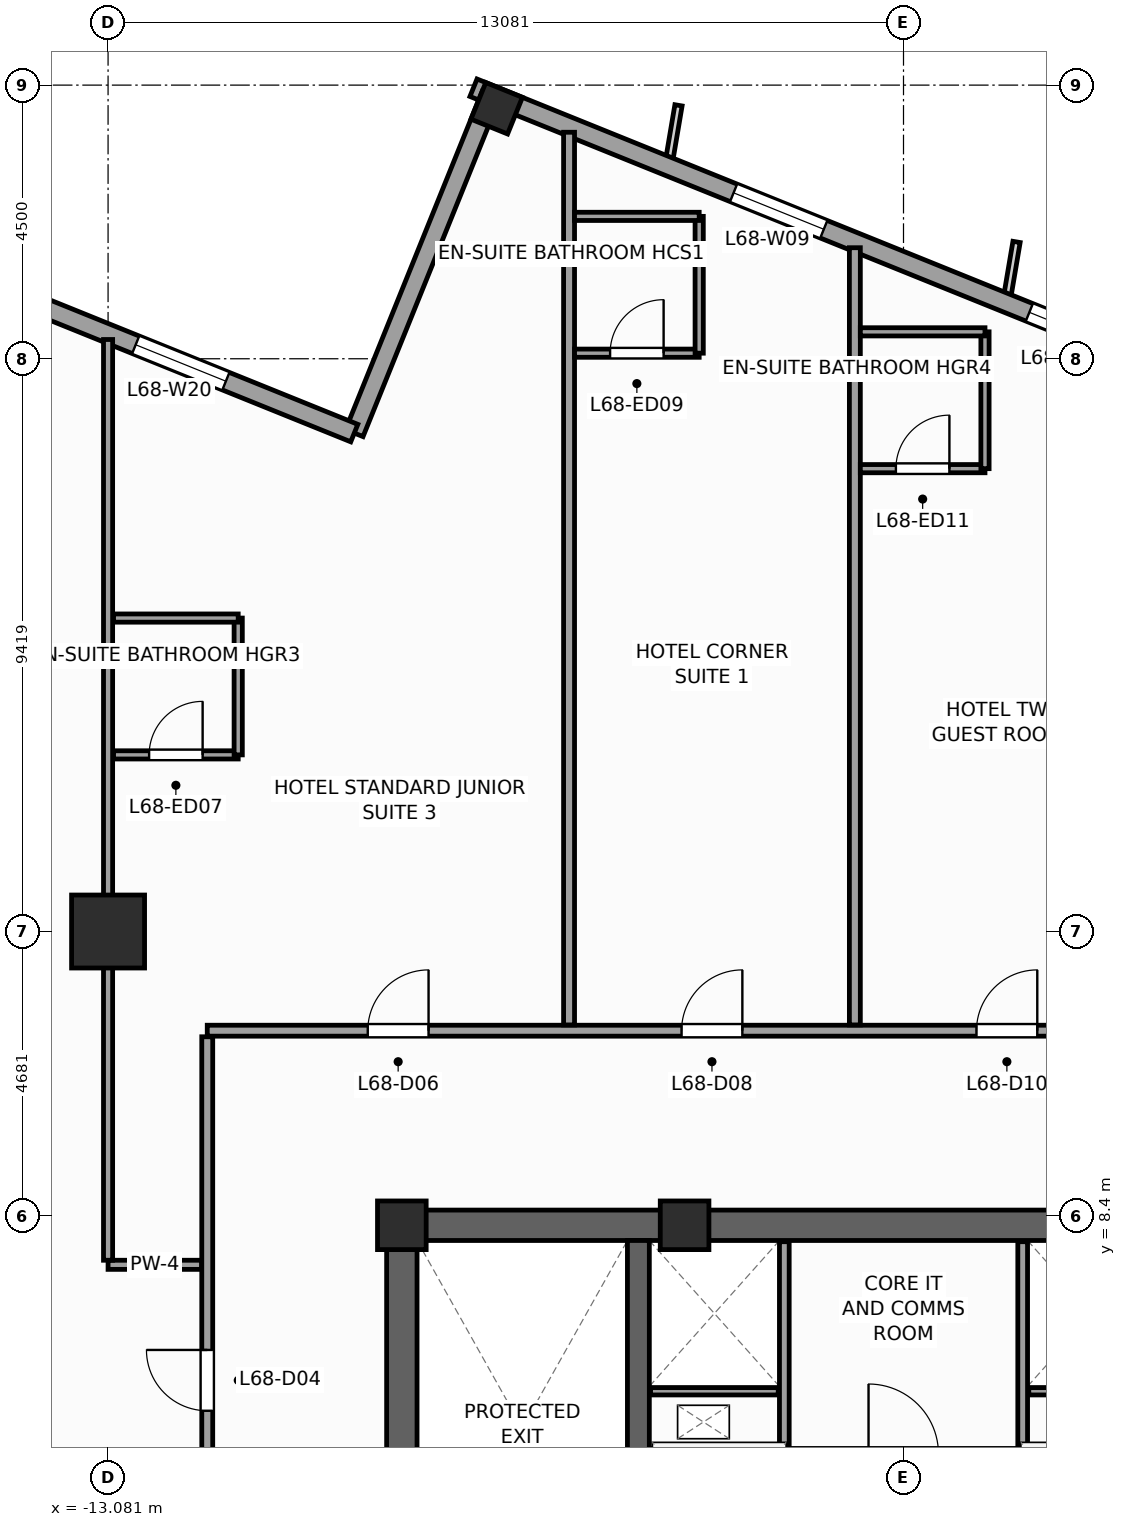
"""IFC4 building model, lengths in metres.
Left out: names, types, materials, properties, quantities, classifications, styles, units other than length and angle.
Written with IfcOpenShell. Run it as: python <this file> out.ifc"""

import sys

from ifc_helpers import new_model, si_unit, direction, frame, frame_2d, origin, origin_2d, place, context, subcontext, project, spatial, rectangle, extrude, source, transform, mapped, element, fill, save


model = new_model("IFC4")
c1 = context("Model", 3, precision=1e-05, world=origin(), true_north=direction((0.0, 1.0)))
c2 = subcontext(c1, "Body", "Model", "MODEL_VIEW")
j1 = project(units=[si_unit("LENGTHUNIT", "METRE"), si_unit("PLANEANGLEUNIT", "RADIAN")], contexts=[c1])
p1 = place(None, origin())
s1 = spatial("IfcSite", under=j1, at=p1, CompositionType="ELEMENT")
p2 = place(p1, origin())
s2 = spatial("IfcBuilding", under=s1, at=p2, CompositionType="ELEMENT")
p3 = place(p2, frame((0.0, 0.0, 279.6)))
s3 = spatial("IfcBuildingStorey", under=s2, at=p3, CompositionType="ELEMENT", Elevation=279.6)
p4 = place(p3, frame((-8.5, 8.25, 0.0), z_axis=(0.0, 0.0, 1.0), x_axis=(1.0, 0.0, 0.0)))
e1 = element("IfcWall", 1, at=p4, inside=s3, PredefinedType="SHEAR", context=c2, shape_type="SweptSolid", body=[
    extrude(rectangle(XDim=17.0, YDim=0.5, at=frame_2d((8.5, 0.0))), origin(), (0.0, 0.0, 1.0), 3.6),
])
p5 = place(p3, frame((-8.25, -8.0, 0.0), z_axis=(0.0, 0.0, 1.0), x_axis=(0.0, 1.0, 0.0)))
e2 = element("IfcWall", 2, at=p5, inside=s3, PredefinedType="SHEAR", context=c2, shape_type="SweptSolid", body=[
    extrude(rectangle(XDim=16.0, YDim=0.5, at=frame_2d((8.0, 0.0))), origin(), (0.0, 0.0, 1.0), 3.6),
])
p6 = place(p5, frame((4.69, 0.0, 0.0)))
e3 = element("IfcOpeningElement", 3, at=p6, cuts=e2, PredefinedType="OPENING", context=c2, shape_type="SweptSolid", body=[
    extrude(rectangle(XDim=1.3, YDim=2.2, at=frame_2d((0.65, 1.1))), frame((0.0, 0.26, 0.0), z_axis=(0.0, -1.0, 0.0), x_axis=(1.0, 0.0, 0.0)), (0.0, 0.0, 1.0), 0.52),
])
p7 = place(p3, frame((-4.36, -8.0, 0.0), z_axis=(0.0, 0.0, 1.0), x_axis=(0.0, 1.0, 0.0)))
e4 = element("IfcWall", 4, at=p7, inside=s3, PredefinedType="SHEAR", context=c2, shape_type="SweptSolid", body=[
    extrude(rectangle(XDim=16.0, YDim=0.36, at=frame_2d((8.0, 0.0))), origin(), (0.0, 0.0, 1.0), 3.6),
])
m1 = source(origin(), c2, "Body", "SweptSolid", [
    extrude(rectangle(XDim=0.8, YDim=0.8, at=origin_2d()), origin(), (0.0, 0.0, 1.0), 3.6),
])
for number, where, z_axis, x_axis in (
    (5, (-8.25, 8.25, 0.0), (0.0, 0.0, 1.0), (1.0, 0.0, 0.0)),
    (6, (-3.6, 8.25, 0.0), (0.0, 0.0, 1.0), (1.0, 0.0, 0.0)),
):
    element("IfcColumn", number, at=place(p3, frame(where, z_axis=z_axis, x_axis=x_axis)), inside=s3, PredefinedType="PILASTER", context=c2, shape_type="MappedRepresentation", body=[
        mapped(m1, transform((0.0, 0.0, 0.0), scale=1.0)),
    ])
m2 = source(origin(), c2, "Body", "SweptSolid", [
    extrude(rectangle(XDim=1.2, YDim=1.2, at=origin_2d()), origin(), (0.0, 0.0, 1.0), 3.6),
])
p8 = place(p3, frame((-13.081, 13.081, 0.0), z_axis=(0.0, 0.0, 1.0), x_axis=(1.0, 0.0, 0.0)))
e7 = element("IfcColumn", 7, at=p8, inside=s3, PredefinedType="COLUMN", context=c2, shape_type="MappedRepresentation", body=[
    mapped(m2, transform((0.0, 0.0, 0.0), scale=1.0)),
])
m3 = source(origin(), c2, "Body", "SweptSolid", [
    extrude(rectangle(XDim=0.65, YDim=0.65, at=origin_2d()), origin(), (0.0, 0.0, 1.0), 3.6),
])
p9 = place(p3, frame((-6.69, 26.62, 0.0), z_axis=(0.0, 0.0, 1.0), x_axis=(0.374606593416, 0.927183854567, 0.0)))
e8 = element("IfcColumn", 8, at=p9, inside=s3, PredefinedType="COLUMN", context=c2, shape_type="MappedRepresentation", body=[
    mapped(m3, transform((0.0, 0.0, 0.0), scale=1.0)),
])
p10 = place(p3, frame((23.813, 14.479, 0.0), z_axis=(0.0, 0.0, 1.0), x_axis=(-0.927182657188, 0.374609557019, 0.0)))
e9 = element("IfcWall", 9, at=p10, inside=s3, PredefinedType="STANDARD", context=c2, shape_type="SweptSolid", body=[
    extrude(rectangle(XDim=33.31, YDim=0.31, at=frame_2d((16.655, 0.0))), origin(), (0.0, 0.0, 1.0), 2.75),
])
p11 = place(p10, frame((3.197, 0.0, 0.47)))
e10 = element("IfcOpeningElement", 10, at=p11, cuts=e9, PredefinedType="OPENING", context=c2, shape_type="SweptSolid", body=[
    extrude(rectangle(XDim=1.6, YDim=2.1, at=frame_2d((0.8, 1.05))), frame((0.0, 0.165, 0.0), z_axis=(0.0, -1.0, 0.0), x_axis=(1.0, 0.0, 0.0)), (0.0, 0.0, 1.0), 0.33),
])
p12 = place(p10, frame((8.86, 0.0, 0.47)))
e11 = element("IfcOpeningElement", 11, at=p12, cuts=e9, PredefinedType="OPENING", context=c2, shape_type="SweptSolid", body=[
    extrude(rectangle(XDim=1.6, YDim=2.1, at=frame_2d((0.8, 1.05))), frame((0.0, 0.165, 0.0), z_axis=(0.0, -1.0, 0.0), x_axis=(1.0, 0.0, 0.0)), (0.0, 0.0, 1.0), 0.33),
])
p13 = place(p10, frame((14.439, 0.0, 0.47)))
e12 = element("IfcOpeningElement", 12, at=p13, cuts=e9, PredefinedType="OPENING", context=c2, shape_type="SweptSolid", body=[
    extrude(rectangle(XDim=1.6, YDim=2.1, at=frame_2d((0.8, 1.05))), frame((0.0, 0.165, 0.0), z_axis=(0.0, -1.0, 0.0), x_axis=(1.0, 0.0, 0.0)), (0.0, 0.0, 1.0), 0.33),
])
p14 = place(p10, frame((21.851, 0.0, 0.47)))
e13 = element("IfcOpeningElement", 13, at=p14, cuts=e9, PredefinedType="OPENING", context=c2, shape_type="SweptSolid", body=[
    extrude(rectangle(XDim=1.6, YDim=2.1, at=frame_2d((0.8, 1.05))), frame((0.0, 0.165, 0.0), z_axis=(0.0, -1.0, 0.0), x_axis=(1.0, 0.0, 0.0)), (0.0, 0.0, 1.0), 0.33),
])
p15 = place(p10, frame((27.097, 0.0, 0.47)))
e14 = element("IfcOpeningElement", 14, at=p15, cuts=e9, PredefinedType="OPENING", context=c2, shape_type="SweptSolid", body=[
    extrude(rectangle(XDim=1.6, YDim=2.1, at=frame_2d((0.8, 1.05))), frame((0.0, 0.165, 0.0), z_axis=(0.0, -1.0, 0.0), x_axis=(1.0, 0.0, 0.0)), (0.0, 0.0, 1.0), 0.33),
])
p16 = place(p3, frame((-6.784, 26.841, 0.0), z_axis=(0.0, 0.0, 1.0), x_axis=(-0.374636620962, -0.927171722085, 0.0)))
e15 = element("IfcWall", 15, at=p16, inside=s3, PredefinedType="STANDARD", context=c2, shape_type="SweptSolid", body=[
    extrude(rectangle(XDim=6.0, YDim=0.31, at=frame_2d((3.0, 0.0))), origin(), (0.0, 0.0, 1.0), 2.65),
])
p17 = place(p3, frame((-9.032, 21.278, 0.0), z_axis=(0.0, 0.0, 1.0), x_axis=(-0.927185411764, 0.374602739196, 0.0)))
e16 = element("IfcWall", 16, at=p17, inside=s3, PredefinedType="STANDARD", context=c2, shape_type="SweptSolid", body=[
    extrude(rectangle(XDim=6.155, YDim=0.31, at=frame_2d((3.078, 0.0))), origin(), (0.0, 0.0, 1.0), 3.35),
])
p18 = place(p17, frame((2.278, 0.0, 0.47)))
e17 = element("IfcOpeningElement", 17, at=p18, cuts=e16, PredefinedType="OPENING", context=c2, shape_type="SweptSolid", body=[
    extrude(rectangle(XDim=1.6, YDim=2.1, at=frame_2d((0.8, 1.05))), frame((0.0, 0.165, 0.0), z_axis=(0.0, -1.0, 0.0), x_axis=(1.0, 0.0, 0.0)), (0.0, 0.0, 1.0), 0.33),
])
for number, where, z_axis, x_axis in (
    (18, (-1.96, 4.58, 0.0), (0.0, 0.0, 1.0), (0.0, 1.0, 0.0)),
    (19, (1.96, 4.58, 0.0), (0.0, 0.0, 1.0), (0.0, 1.0, 0.0)),
):
    element("IfcWall", number, at=place(p3, frame(where, z_axis=z_axis, x_axis=x_axis)), inside=s3, PredefinedType="PARTITIONING", context=c2, shape_type="SweptSolid", body=[
        extrude(rectangle(XDim=3.4, YDim=0.16, at=frame_2d((1.7, 0.0))), origin(), (0.0, 0.0, 1.0), 3.35),
    ])
for number, where, z_axis, x_axis in (
    (20, (-4.16, 5.52, 0.0), (0.0, 0.0, 1.0), (1.0, 0.0, 0.0)),
    (21, (2.06, 5.52, 0.0), (0.0, 0.0, 1.0), (1.0, 0.0, 0.0)),
):
    element("IfcWall", number, at=place(p3, frame(where, z_axis=z_axis, x_axis=x_axis)), inside=s3, PredefinedType="PARTITIONING", context=c2, shape_type="SweptSolid", body=[
        extrude(rectangle(XDim=2.1, YDim=0.12, at=frame_2d((1.05, 0.0))), origin(), (0.0, 0.0, 1.0), 3.35),
    ])
p19 = place(p3, frame((-11.45, 11.45, 0.0), z_axis=(0.0, 0.0, 1.0), x_axis=(1.0, 0.0, 0.0)))
e22 = element("IfcWall", 22, at=p19, inside=s3, PredefinedType="PARTITIONING", context=c2, shape_type="SweptSolid", body=[
    extrude(rectangle(XDim=21.75, YDim=0.18, at=frame_2d((10.875, 0.0))), origin(), (0.0, 0.0, 1.0), 3.35),
])
p20 = place(p19, frame((2.639, 0.0, 0.0)))
e23 = element("IfcOpeningElement", 23, at=p20, cuts=e22, PredefinedType="OPENING", context=c2, shape_type="SweptSolid", body=[
    extrude(rectangle(XDim=1.0, YDim=2.15, at=frame_2d((0.5, 1.075))), frame((0.0, 0.1, 0.0), z_axis=(0.0, -1.0, 0.0), x_axis=(1.0, 0.0, 0.0)), (0.0, 0.0, 1.0), 0.2),
])
p21 = place(p19, frame((7.8, 0.0, 0.0)))
e24 = element("IfcOpeningElement", 24, at=p21, cuts=e22, PredefinedType="OPENING", context=c2, shape_type="SweptSolid", body=[
    extrude(rectangle(XDim=1.0, YDim=2.15, at=frame_2d((0.5, 1.075))), frame((0.0, 0.1, 0.0), z_axis=(0.0, -1.0, 0.0), x_axis=(1.0, 0.0, 0.0)), (0.0, 0.0, 1.0), 0.2),
])
p22 = place(p19, frame((12.65, 0.0, 0.0)))
e25 = element("IfcOpeningElement", 25, at=p22, cuts=e22, PredefinedType="OPENING", context=c2, shape_type="SweptSolid", body=[
    extrude(rectangle(XDim=1.0, YDim=2.15, at=frame_2d((0.5, 1.075))), frame((0.0, 0.1, 0.0), z_axis=(0.0, -1.0, 0.0), x_axis=(1.0, 0.0, 0.0)), (0.0, 0.0, 1.0), 0.2),
])
p23 = place(p19, frame((18.036, 0.0, 0.0)))
e26 = element("IfcOpeningElement", 26, at=p23, cuts=e22, PredefinedType="OPENING", context=c2, shape_type="SweptSolid", body=[
    extrude(rectangle(XDim=1.0, YDim=2.15, at=frame_2d((0.5, 1.075))), frame((0.0, 0.1, 0.0), z_axis=(0.0, -1.0, 0.0), x_axis=(1.0, 0.0, 0.0)), (0.0, 0.0, 1.0), 0.2),
])
p24 = place(p3, frame((-11.45, -12.35, 0.0), z_axis=(0.0, 0.0, 1.0), x_axis=(0.0, 1.0, 0.0)))
e27 = element("IfcWall", 27, at=p24, inside=s3, PredefinedType="PARTITIONING", context=c2, shape_type="SweptSolid", body=[
    extrude(rectangle(XDim=23.7, YDim=0.18, at=frame_2d((11.85, 0.0))), origin(), (0.0, 0.0, 1.0), 3.35),
])
p25 = place(p24, frame((13.75, 0.0, 0.0)))
e28 = element("IfcOpeningElement", 28, at=p25, cuts=e27, PredefinedType="OPENING", context=c2, shape_type="SweptSolid", body=[
    extrude(rectangle(XDim=1.0, YDim=2.15, at=frame_2d((0.5, 1.075))), frame((0.0, 0.1, 0.0), z_axis=(0.0, -1.0, 0.0), x_axis=(1.0, 0.0, 0.0)), (0.0, 0.0, 1.0), 0.2),
])
p26 = place(p24, frame((17.55, 0.0, 0.0)))
e29 = element("IfcOpeningElement", 29, at=p26, cuts=e27, PredefinedType="OPENING", context=c2, shape_type="SweptSolid", body=[
    extrude(rectangle(XDim=1.0, YDim=2.15, at=frame_2d((0.5, 1.075))), frame((0.0, 0.1, 0.0), z_axis=(0.0, -1.0, 0.0), x_axis=(1.0, 0.0, 0.0)), (0.0, 0.0, 1.0), 0.2),
])
p27 = place(p24, frame((6.15, 0.0, 0.0)))
e30 = element("IfcOpeningElement", 30, at=p27, cuts=e27, PredefinedType="OPENING", context=c2, shape_type="SweptSolid", body=[
    extrude(rectangle(XDim=1.0, YDim=2.15, at=frame_2d((0.5, 1.075))), frame((0.0, 0.1, 0.0), z_axis=(0.0, -1.0, 0.0), x_axis=(1.0, 0.0, 0.0)), (0.0, 0.0, 1.0), 0.2),
])
p28 = place(p24, frame((9.95, 0.0, 0.0)))
e31 = element("IfcOpeningElement", 31, at=p28, cuts=e27, PredefinedType="OPENING", context=c2, shape_type="SweptSolid", body=[
    extrude(rectangle(XDim=1.0, YDim=2.15, at=frame_2d((0.5, 1.075))), frame((0.0, 0.1, 0.0), z_axis=(0.0, -1.0, 0.0), x_axis=(1.0, 0.0, 0.0)), (0.0, 0.0, 1.0), 0.2),
])
p29 = place(p3, frame((-5.5, 11.545, 0.0), z_axis=(0.0, 0.0, 1.0), x_axis=(0.0, 1.0, 0.0)))
e32 = element("IfcWall", 32, at=p29, inside=s3, PredefinedType="PARTITIONING", context=c2, shape_type="SweptSolid", body=[
    extrude(rectangle(XDim=14.68, YDim=0.18, at=frame_2d((7.34, 0.0))), origin(), (0.0, 0.0, 1.0), 3.35),
])
p30 = place(p3, frame((-0.8, 11.545, 0.0), z_axis=(0.0, 0.0, 1.0), x_axis=(0.0, 1.0, 0.0)))
e33 = element("IfcWall", 33, at=p30, inside=s3, PredefinedType="PARTITIONING", context=c2, shape_type="SweptSolid", body=[
    extrude(rectangle(XDim=12.781, YDim=0.18, at=frame_2d((6.391, 0.0))), origin(), (0.0, 0.0, 1.0), 3.35),
])
p31 = place(p3, frame((-11.545, 7.6, 0.0), z_axis=(0.0, 0.0, 1.0), x_axis=(-1.0, 0.0, 0.0)))
e34 = element("IfcWall", 34, at=p31, inside=s3, PredefinedType="PARTITIONING", context=c2, shape_type="SweptSolid", body=[
    extrude(rectangle(XDim=1.536, YDim=0.15, at=frame_2d((0.768, 0.0))), origin(), (0.0, 0.0, 1.0), 3.35),
])
p32 = place(p3, frame((-13.081, 7.675, 0.0), z_axis=(0.0, 0.0, 1.0), x_axis=(0.0, 1.0, 0.0)))
e35 = element("IfcWall", 35, at=p32, inside=s3, PredefinedType="PARTITIONING", context=c2, shape_type="SweptSolid", body=[
    extrude(rectangle(XDim=15.142, YDim=0.15, at=frame_2d((7.571, 0.0))), origin(), (0.0, 0.0, 1.0), 2.45),
])
p33 = place(p3, frame((-12.991, 15.986, 0.0), z_axis=(0.0, 0.0, 1.0), x_axis=(1.0, 0.0, 0.0)))
e36 = element("IfcWall", 36, at=p33, inside=s3, PredefinedType="PARTITIONING", context=c2, shape_type="SweptSolid", body=[
    extrude(rectangle(XDim=2.05, YDim=0.135, at=frame_2d((1.025, 0.0))), origin(), (0.0, 0.0, 1.0), 3.35),
])
p34 = place(p33, frame((0.585, 0.0, 0.0)))
e37 = element("IfcOpeningElement", 37, at=p34, cuts=e36, PredefinedType="OPENING", context=c2, shape_type="SweptSolid", body=[
    extrude(rectangle(XDim=0.88, YDim=2.1, at=frame_2d((0.44, 1.05))), frame((0.0, 0.078, 0.0), z_axis=(0.0, -1.0, 0.0), x_axis=(1.0, 0.0, 0.0)), (0.0, 0.0, 1.0), 0.155),
])
p35 = place(p3, frame((-10.941, 15.986, 0.0), z_axis=(0.0, 0.0, 1.0), x_axis=(0.0, 1.0, 0.0)))
e38 = element("IfcWall", 38, at=p35, inside=s3, PredefinedType="PARTITIONING", context=c2, shape_type="SweptSolid", body=[
    extrude(rectangle(XDim=2.25, YDim=0.135, at=frame_2d((1.125, 0.0))), origin(), (0.0, 0.0, 1.0), 3.35),
])
p36 = place(p3, frame((-12.991, 18.236, 0.0), z_axis=(0.0, 0.0, 1.0), x_axis=(1.0, 0.0, 0.0)))
e39 = element("IfcWall", 39, at=p36, inside=s3, PredefinedType="PARTITIONING", context=c2, shape_type="SweptSolid", body=[
    extrude(rectangle(XDim=2.05, YDim=0.135, at=frame_2d((1.025, 0.0))), origin(), (0.0, 0.0, 1.0), 3.35),
])
p37 = place(p3, frame((-5.41, 22.592, 0.0), z_axis=(0.0, 0.0, 1.0), x_axis=(1.0, 0.0, 0.0)))
e40 = element("IfcWall", 40, at=p37, inside=s3, PredefinedType="PARTITIONING", context=c2, shape_type="SweptSolid", body=[
    extrude(rectangle(XDim=2.05, YDim=0.135, at=frame_2d((1.025, 0.0))), origin(), (0.0, 0.0, 1.0), 3.35),
])
p38 = place(p37, frame((0.585, 0.0, 0.0)))
e41 = element("IfcOpeningElement", 41, at=p38, cuts=e40, PredefinedType="OPENING", context=c2, shape_type="SweptSolid", body=[
    extrude(rectangle(XDim=0.88, YDim=2.1, at=frame_2d((0.44, 1.05))), frame((0.0, 0.078, 0.0), z_axis=(0.0, -1.0, 0.0), x_axis=(1.0, 0.0, 0.0)), (0.0, 0.0, 1.0), 0.155),
])
p39 = place(p3, frame((-3.36, 22.592, 0.0), z_axis=(0.0, 0.0, 1.0), x_axis=(0.0, 1.0, 0.0)))
e42 = element("IfcWall", 42, at=p39, inside=s3, PredefinedType="PARTITIONING", context=c2, shape_type="SweptSolid", body=[
    extrude(rectangle(XDim=2.25, YDim=0.135, at=frame_2d((1.125, 0.0))), origin(), (0.0, 0.0, 1.0), 3.35),
])
p40 = place(p3, frame((-5.41, 24.842, 0.0), z_axis=(0.0, 0.0, 1.0), x_axis=(1.0, 0.0, 0.0)))
e43 = element("IfcWall", 43, at=p40, inside=s3, PredefinedType="PARTITIONING", context=c2, shape_type="SweptSolid", body=[
    extrude(rectangle(XDim=2.05, YDim=0.135, at=frame_2d((1.025, 0.0))), origin(), (0.0, 0.0, 1.0), 3.35),
])
p41 = place(p3, frame((-0.71, 20.693, 0.0), z_axis=(0.0, 0.0, 1.0), x_axis=(1.0, 0.0, 0.0)))
e44 = element("IfcWall", 44, at=p41, inside=s3, PredefinedType="PARTITIONING", context=c2, shape_type="SweptSolid", body=[
    extrude(rectangle(XDim=2.05, YDim=0.135, at=frame_2d((1.025, 0.0))), origin(), (0.0, 0.0, 1.0), 3.35),
])
p42 = place(p41, frame((0.585, 0.0, 0.0)))
e45 = element("IfcOpeningElement", 45, at=p42, cuts=e44, PredefinedType="OPENING", context=c2, shape_type="SweptSolid", body=[
    extrude(rectangle(XDim=0.88, YDim=2.1, at=frame_2d((0.44, 1.05))), frame((0.0, 0.078, 0.0), z_axis=(0.0, -1.0, 0.0), x_axis=(1.0, 0.0, 0.0)), (0.0, 0.0, 1.0), 0.155),
])
p43 = place(p3, frame((1.34, 20.693, 0.0), z_axis=(0.0, 0.0, 1.0), x_axis=(0.0, 1.0, 0.0)))
e46 = element("IfcWall", 46, at=p43, inside=s3, PredefinedType="PARTITIONING", context=c2, shape_type="SweptSolid", body=[
    extrude(rectangle(XDim=2.25, YDim=0.135, at=frame_2d((1.125, 0.0))), origin(), (0.0, 0.0, 1.0), 3.35),
])
p44 = place(p3, frame((-0.71, 22.943, 0.0), z_axis=(0.0, 0.0, 1.0), x_axis=(1.0, 0.0, 0.0)))
e47 = element("IfcWall", 47, at=p44, inside=s3, PredefinedType="PARTITIONING", context=c2, shape_type="SweptSolid", body=[
    extrude(rectangle(XDim=2.05, YDim=0.135, at=frame_2d((1.025, 0.0))), origin(), (0.0, 0.0, 1.0), 3.35),
])
m4 = source(origin(), c2, "Body", "SweptSolid", [
    extrude(rectangle(XDim=1.6, YDim=2.1, at=frame_2d((0.8, 1.05))), frame((0.0, 0.03, 0.0), z_axis=(0.0, -1.0, 0.0), x_axis=(1.0, 0.0, 0.0)), (0.0, 0.0, 1.0), 0.06),
])
p45 = place(p14, origin())
e48 = element("IfcWindow", 48, at=p45, inside=s3, PartitioningType="SINGLE_PANEL", PredefinedType="WINDOW", context=c2, shape_type="MappedRepresentation", body=[
    mapped(m4, transform((0.0, 0.0, 0.0), scale=1.0)),
])
fill(e13, e48)
p46 = place(p15, origin())
e49 = element("IfcWindow", 49, at=p46, inside=s3, PartitioningType="SINGLE_PANEL", PredefinedType="WINDOW", context=c2, shape_type="MappedRepresentation", body=[
    mapped(m4, transform((0.0, 0.0, 0.0), scale=1.0)),
])
fill(e14, e49)
p47 = place(p18, origin())
e50 = element("IfcWindow", 50, at=p47, inside=s3, PartitioningType="SINGLE_PANEL", PredefinedType="WINDOW", context=c2, shape_type="MappedRepresentation", body=[
    mapped(m4, transform((0.0, 0.0, 0.0), scale=1.0)),
])
fill(e17, e50)
m5 = source(origin(), c2, "Body", "SweptSolid", [
    extrude(rectangle(XDim=1.0, YDim=2.15, at=frame_2d((0.5, 1.075))), frame((0.0, 0.025, 0.0), z_axis=(0.0, -1.0, 0.0), x_axis=(1.0, 0.0, 0.0)), (0.0, 0.0, 1.0), 0.05),
])
p48 = place(p26, origin())
e51 = element("IfcDoor", 51, at=p48, inside=s3, OperationType="SINGLE_SWING_RIGHT", PredefinedType="DOOR", context=c2, shape_type="MappedRepresentation", body=[
    mapped(m5, transform((0.0, 0.0, 0.0), scale=1.0)),
])
fill(e29, e51)
p49 = place(p20, origin())
e52 = element("IfcDoor", 52, at=p49, inside=s3, OperationType="SINGLE_SWING_RIGHT", PredefinedType="DOOR", context=c2, shape_type="MappedRepresentation", body=[
    mapped(m5, transform((0.0, 0.0, 0.0), scale=1.0)),
])
fill(e23, e52)
m6 = source(origin(), c2, "Body", "SweptSolid", [
    extrude(rectangle(XDim=0.88, YDim=2.1, at=frame_2d((0.44, 1.05))), frame((0.0, 0.025, 0.0), z_axis=(0.0, -1.0, 0.0), x_axis=(1.0, 0.0, 0.0)), (0.0, 0.0, 1.0), 0.05),
])
p50 = place(p34, origin())
e53 = element("IfcDoor", 53, at=p50, inside=s3, OperationType="SINGLE_SWING_RIGHT", PredefinedType="DOOR", context=c2, shape_type="MappedRepresentation", body=[
    mapped(m6, transform((0.0, 0.0, 0.0), scale=1.0)),
])
fill(e37, e53)
p51 = place(p21, origin())
e54 = element("IfcDoor", 54, at=p51, inside=s3, OperationType="SINGLE_SWING_RIGHT", PredefinedType="DOOR", context=c2, shape_type="MappedRepresentation", body=[
    mapped(m5, transform((0.0, 0.0, 0.0), scale=1.0)),
])
fill(e24, e54)
p52 = place(p38, origin())
e55 = element("IfcDoor", 55, at=p52, inside=s3, OperationType="SINGLE_SWING_RIGHT", PredefinedType="DOOR", context=c2, shape_type="MappedRepresentation", body=[
    mapped(m6, transform((0.0, 0.0, 0.0), scale=1.0)),
])
fill(e41, e55)
p53 = place(p22, origin())
e56 = element("IfcDoor", 56, at=p53, inside=s3, OperationType="SINGLE_SWING_RIGHT", PredefinedType="DOOR", context=c2, shape_type="MappedRepresentation", body=[
    mapped(m5, transform((0.0, 0.0, 0.0), scale=1.0)),
])
fill(e25, e56)
p54 = place(p42, origin())
e57 = element("IfcDoor", 57, at=p54, inside=s3, OperationType="SINGLE_SWING_RIGHT", PredefinedType="DOOR", context=c2, shape_type="MappedRepresentation", body=[
    mapped(m6, transform((0.0, 0.0, 0.0), scale=1.0)),
])
fill(e45, e57)
save(model, sys.argv[1])
